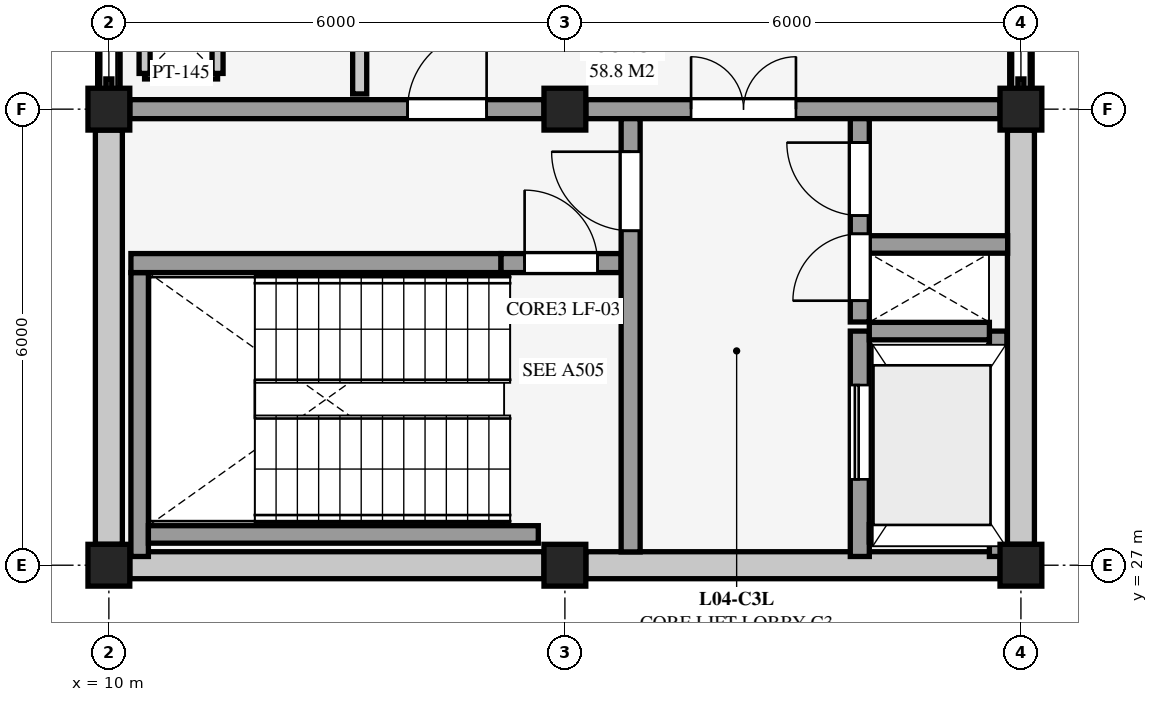
"""IFC4 building model, lengths in metres.
Left out: names, types, materials, properties, quantities, classifications, styles, units other than length and angle.
Written with IfcOpenShell. Run it as: python <this file> out.ifc"""

import sys

from ifc_helpers import new_model, si_unit, direction, frame, frame_2d, origin, origin_2d, place, context, subcontext, project, spatial, rectangle, extrude, element, fill, save


model = new_model("IFC4")
c1 = context("Model", 3, precision=1e-05, world=origin(), true_north=direction((0.0, 1.0)))
c2 = subcontext(c1, "Body", "Model", "MODEL_VIEW")
j1 = project(units=[si_unit("LENGTHUNIT", "METRE"), si_unit("PLANEANGLEUNIT", "RADIAN")], contexts=[c1])
p1 = place(None, origin())
s1 = spatial("IfcSite", under=j1, at=p1, CompositionType="ELEMENT")
p2 = place(p1, origin())
s2 = spatial("IfcBuilding", under=s1, at=p2, CompositionType="ELEMENT")
p3 = place(p2, frame((0.0, 0.0, 13.5)))
s3 = spatial("IfcBuildingStorey", under=s2, at=p3, CompositionType="ELEMENT", Elevation=13.5)
for number, where, z_axis, x_axis in (
    (1, (10.0, 27.0, 0.0), (0.0, 0.0, 1.0), (1.0, 0.0, 0.0)),
    (2, (10.0, 33.0, 0.0), (0.0, 0.0, 1.0), (1.0, 0.0, 0.0)),
    (3, (16.0, 27.0, 0.0), (0.0, 0.0, 1.0), (1.0, 0.0, 0.0)),
    (4, (16.0, 33.0, 0.0), (0.0, 0.0, 1.0), (1.0, 0.0, 0.0)),
    (5, (22.0, 27.0, 0.0), (0.0, 0.0, 1.0), (1.0, 0.0, 0.0)),
    (6, (22.0, 33.0, 0.0), (0.0, 0.0, 1.0), (1.0, 0.0, 0.0)),
):
    element("IfcColumn", number, at=place(p3, frame(where, z_axis=z_axis, x_axis=x_axis)), inside=s3, PredefinedType="COLUMN", context=c2, shape_type="SweptSolid", body=[
        extrude(rectangle(XDim=0.55, YDim=0.55, at=origin_2d()), origin(), (0.0, 0.0, 1.0), 4.5),
    ])
p4 = place(p3, frame((15.725, 27.0, 0.0), z_axis=(0.0, 0.0, 1.0), x_axis=(-1.0, 0.0, 0.0)))
e7 = element("IfcWall", 7, at=p4, inside=s3, PredefinedType="SOLIDWALL", context=c2, shape_type="SweptSolid", body=[
    extrude(rectangle(XDim=5.45, YDim=0.355, at=frame_2d((2.725, 0.0))), origin(), (0.0, 0.0, 1.0), 3.749),
])
p5 = place(p3, frame((21.725, 27.0, 0.0), z_axis=(0.0, 0.0, 1.0), x_axis=(-1.0, 0.0, 0.0)))
e8 = element("IfcWall", 8, at=p5, inside=s3, PredefinedType="SOLIDWALL", context=c2, shape_type="SweptSolid", body=[
    extrude(rectangle(XDim=5.45, YDim=0.355, at=frame_2d((2.725, 0.0))), origin(), (0.0, 0.0, 1.0), 3.831),
])
for number, where, z_axis, x_axis in (
    (9, (10.0, 27.275, 0.0), (0.0, 0.0, 1.0), (0.0, 1.0, 0.0)),
    (10, (22.0, 32.725, 0.0), (0.0, 0.0, 1.0), (0.0, -1.0, 0.0)),
):
    element("IfcWall", number, at=place(p3, frame(where, z_axis=z_axis, x_axis=x_axis)), inside=s3, PredefinedType="SOLIDWALL", context=c2, shape_type="SweptSolid", body=[
        extrude(rectangle(XDim=5.45, YDim=0.355, at=frame_2d((2.725, 0.0))), origin(), (0.0, 0.0, 1.0), 3.881),
    ])
p6 = place(p3, frame((10.0, 33.275, 0.0), z_axis=(0.0, 0.0, 1.0), x_axis=(0.0, 1.0, 0.0)))
e11 = element("IfcWall", 11, at=p6, inside=s3, PredefinedType="SOLIDWALL", context=c2, shape_type="SweptSolid", body=[
    extrude(rectangle(XDim=5.45, YDim=0.295, at=frame_2d((2.725, 0.0))), origin(), (0.0, 0.0, 1.0), 0.52),
])
p7 = place(p3, frame((22.0, 38.725, 0.0), z_axis=(0.0, 0.0, 1.0), x_axis=(0.0, -1.0, 0.0)))
e12 = element("IfcWall", 12, at=p7, inside=s3, PredefinedType="SOLIDWALL", context=c2, shape_type="SweptSolid", body=[
    extrude(rectangle(XDim=5.45, YDim=0.295, at=frame_2d((2.725, 0.0))), origin(), (0.0, 0.0, 1.0), 0.16),
])
for number, where, z_axis, x_axis in (
    (13, (10.47, 33.47, 0.0), (0.0, 0.0, 1.0), (1.0, 0.0, 0.0)),
    (14, (11.43, 33.47, 0.0), (0.0, 0.0, 1.0), (0.0, 1.0, 0.0)),
    (15, (10.47, 34.43, 0.0), (0.0, 0.0, 1.0), (0.0, -1.0, 0.0)),
):
    element("IfcWall", number, at=place(p3, frame(where, z_axis=z_axis, x_axis=x_axis)), inside=s3, PredefinedType="PARTITIONING", context=c2, shape_type="SweptSolid", body=[
        extrude(rectangle(XDim=0.96, YDim=0.145, at=frame_2d((0.48, 0.0))), origin(), (0.0, 0.0, 1.0), 4.288),
    ])
p8 = place(p3, frame((10.275, 33.0, 0.0), z_axis=(0.0, 0.0, 1.0), x_axis=(1.0, 0.0, 0.0)))
e16 = element("IfcWall", 16, at=p8, inside=s3, PredefinedType="SHEAR", context=c2, shape_type="SweptSolid", body=[
    extrude(rectangle(XDim=5.45, YDim=0.25, at=frame_2d((2.725, 0.0))), origin(), (0.0, 0.0, 1.0), 4.288),
])
p9 = place(p8, frame((3.655, 0.0, 0.0)))
e17 = element("IfcOpeningElement", 17, at=p9, cuts=e16, PredefinedType="OPENING", context=c2, shape_type="SweptSolid", body=[
    extrude(rectangle(XDim=1.04, YDim=2.14, at=frame_2d((0.52, 1.07))), frame((0.0, 0.135, 0.0), z_axis=(0.0, -1.0, 0.0), x_axis=(1.0, 0.0, 0.0)), (0.0, 0.0, 1.0), 0.27),
])
p10 = place(p3, frame((16.275, 33.0, 0.0), z_axis=(0.0, 0.0, 1.0), x_axis=(1.0, 0.0, 0.0)))
e18 = element("IfcWall", 18, at=p10, inside=s3, PredefinedType="SHEAR", context=c2, shape_type="SweptSolid", body=[
    extrude(rectangle(XDim=5.45, YDim=0.25, at=frame_2d((2.725, 0.0))), origin(), (0.0, 0.0, 1.0), 4.288),
])
p11 = place(p10, frame((1.385, 0.0, 0.0)))
e19 = element("IfcOpeningElement", 19, at=p11, cuts=e18, PredefinedType="OPENING", context=c2, shape_type="SweptSolid", body=[
    extrude(rectangle(XDim=1.38, YDim=2.16, at=frame_2d((0.69, 1.08))), frame((0.0, 0.135, 0.0), z_axis=(0.0, -1.0, 0.0), x_axis=(1.0, 0.0, 0.0)), (0.0, 0.0, 1.0), 0.27),
])
p12 = place(p3, frame((10.405, 27.115, 0.0), z_axis=(0.0, 0.0, 1.0), x_axis=(0.0, 1.0, 0.0)))
e20 = element("IfcWall", 20, at=p12, inside=s3, PredefinedType="SHEAR", context=c2, shape_type="SweptSolid", body=[
    extrude(rectangle(XDim=3.735, YDim=0.23, at=frame_2d((1.868, 0.0))), origin(), (0.0, 0.0, 1.0), 4.5),
])
p13 = place(p3, frame((10.52, 27.405, 0.0), z_axis=(0.0, 0.0, 1.0), x_axis=(1.0, 0.0, 0.0)))
e21 = element("IfcWall", 21, at=p13, inside=s3, PredefinedType="SHEAR", context=c2, shape_type="SweptSolid", body=[
    extrude(rectangle(XDim=5.13, YDim=0.23, at=frame_2d((2.565, 0.0))), origin(), (0.0, 0.0, 1.0), 4.5),
])
p14 = place(p3, frame((10.29, 30.975, 0.0), z_axis=(0.0, 0.0, 1.0), x_axis=(1.0, 0.0, 0.0)))
e22 = element("IfcWall", 22, at=p14, inside=s3, PredefinedType="SHEAR", context=c2, shape_type="SweptSolid", body=[
    extrude(rectangle(XDim=4.87, YDim=0.25, at=frame_2d((2.435, 0.0))), origin(), (0.0, 0.0, 1.0), 4.5),
])
p15 = place(p3, frame((15.16, 30.975, 0.0), z_axis=(0.0, 0.0, 1.0), x_axis=(1.0, 0.0, 0.0)))
e23 = element("IfcWall", 23, at=p15, inside=s3, PredefinedType="SHEAR", context=c2, shape_type="SweptSolid", body=[
    extrude(rectangle(XDim=1.58, YDim=0.25, at=frame_2d((0.79, 0.0))), origin(), (0.0, 0.0, 1.0), 4.288),
])
p16 = place(p15, frame((0.31, 0.0, 0.0)))
e24 = element("IfcOpeningElement", 24, at=p16, cuts=e23, PredefinedType="OPENING", context=c2, shape_type="SweptSolid", body=[
    extrude(rectangle(XDim=0.96, YDim=2.12, at=frame_2d((0.48, 1.06))), frame((0.0, 0.135, 0.0), z_axis=(0.0, -1.0, 0.0), x_axis=(1.0, 0.0, 0.0)), (0.0, 0.0, 1.0), 0.27),
])
p17 = place(p3, frame((16.865, 27.175, 0.0), z_axis=(0.0, 0.0, 1.0), x_axis=(0.0, 1.0, 0.0)))
e25 = element("IfcWall", 25, at=p17, inside=s3, PredefinedType="SHEAR", context=c2, shape_type="SweptSolid", body=[
    extrude(rectangle(XDim=5.7, YDim=0.25, at=frame_2d((2.85, 0.0))), origin(), (0.0, 0.0, 1.0), 4.288),
])
p18 = place(p17, frame((4.225, 0.0, 0.0)))
e26 = element("IfcOpeningElement", 26, at=p18, cuts=e25, PredefinedType="OPENING", context=c2, shape_type="SweptSolid", body=[
    extrude(rectangle(XDim=1.04, YDim=2.14, at=frame_2d((0.52, 1.07))), frame((0.0, 0.135, 0.0), z_axis=(0.0, -1.0, 0.0), x_axis=(1.0, 0.0, 0.0)), (0.0, 0.0, 1.0), 0.27),
])
p19 = place(p3, frame((19.88, 27.115, 0.0), z_axis=(0.0, 0.0, 1.0), x_axis=(0.0, 1.0, 0.0)))
e27 = element("IfcWall", 27, at=p19, inside=s3, PredefinedType="SHEAR", context=c2, shape_type="SweptSolid", body=[
    extrude(rectangle(XDim=2.965, YDim=0.25, at=frame_2d((1.482, 0.0))), origin(), (0.0, 0.0, 1.0), 4.5),
])
p20 = place(p19, frame((1.015, 0.0, 0.0)))
e28 = element("IfcOpeningElement", 28, at=p20, cuts=e27, PredefinedType="OPENING", context=c2, shape_type="SweptSolid", body=[
    extrude(rectangle(XDim=1.24, YDim=2.2, at=frame_2d((0.62, 1.1))), frame((0.0, 0.135, 0.0), z_axis=(0.0, -1.0, 0.0), x_axis=(1.0, 0.0, 0.0)), (0.0, 0.0, 1.0), 0.27),
])
p21 = place(p3, frame((20.005, 27.42, 0.0), z_axis=(0.0, 0.0, 1.0), x_axis=(1.0, 0.0, 0.0)))
e29 = element("IfcWall", 29, at=p21, inside=s3, PredefinedType="SHEAR", context=c2, shape_type="SweptSolid", body=[
    extrude(rectangle(XDim=1.58, YDim=0.23, at=frame_2d((0.79, 0.0))), origin(), (0.0, 0.0, 1.0), 4.5),
])
p22 = place(p3, frame((21.7, 27.115, 0.0), z_axis=(0.0, 0.0, 1.0), x_axis=(0.0, 1.0, 0.0)))
e30 = element("IfcWall", 30, at=p22, inside=s3, PredefinedType="SHEAR", context=c2, shape_type="SweptSolid", body=[
    extrude(rectangle(XDim=2.965, YDim=0.23, at=frame_2d((1.482, 0.0))), origin(), (0.0, 0.0, 1.0), 4.5),
])
p23 = place(p3, frame((20.005, 30.08, 0.0), z_axis=(0.0, 0.0, 1.0), x_axis=(1.0, 0.0, 0.0)))
e31 = element("IfcWall", 31, at=p23, inside=s3, PredefinedType="SHEAR", context=c2, shape_type="SweptSolid", body=[
    extrude(rectangle(XDim=1.58, YDim=0.23, at=frame_2d((0.79, 0.0))), origin(), (0.0, 0.0, 1.0), 4.5),
])
p24 = place(p3, frame((19.88, 30.2, 0.0), z_axis=(0.0, 0.0, 1.0), x_axis=(0.0, 1.0, 0.0)))
e32 = element("IfcWall", 32, at=p24, inside=s3, PredefinedType="SHEAR", context=c2, shape_type="SweptSolid", body=[
    extrude(rectangle(XDim=2.675, YDim=0.25, at=frame_2d((1.337, 0.0))), origin(), (0.0, 0.0, 1.0), 4.288),
])
p25 = place(p24, frame((0.28, 0.0, 0.0)))
e33 = element("IfcOpeningElement", 33, at=p25, cuts=e32, PredefinedType="OPENING", context=c2, shape_type="SweptSolid", body=[
    extrude(rectangle(XDim=0.88, YDim=2.08, at=frame_2d((0.44, 1.04))), frame((0.0, 0.135, 0.0), z_axis=(0.0, -1.0, 0.0), x_axis=(1.0, 0.0, 0.0)), (0.0, 0.0, 1.0), 0.27),
])
p26 = place(p24, frame((1.4, 0.0, 0.0)))
e34 = element("IfcOpeningElement", 34, at=p26, cuts=e32, PredefinedType="OPENING", context=c2, shape_type="SweptSolid", body=[
    extrude(rectangle(XDim=0.96, YDim=2.12, at=frame_2d((0.48, 1.06))), frame((0.0, 0.135, 0.0), z_axis=(0.0, -1.0, 0.0), x_axis=(1.0, 0.0, 0.0)), (0.0, 0.0, 1.0), 0.27),
])
p27 = place(p3, frame((20.005, 31.22, 0.0), z_axis=(0.0, 0.0, 1.0), x_axis=(1.0, 0.0, 0.0)))
e35 = element("IfcWall", 35, at=p27, inside=s3, PredefinedType="SHEAR", context=c2, shape_type="SweptSolid", body=[
    extrude(rectangle(XDim=1.82, YDim=0.23, at=frame_2d((0.91, 0.0))), origin(), (0.0, 0.0, 1.0), 4.288),
])
p28 = place(p3, frame((13.3, 33.2, 0.0), z_axis=(0.0, 0.0, 1.0), x_axis=(0.0, 1.0, 0.0)))
e36 = element("IfcWall", 36, at=p28, inside=s3, PredefinedType="PARTITIONING", context=c2, shape_type="SweptSolid", body=[
    extrude(rectangle(XDim=7.0, YDim=0.185, at=frame_2d((3.5, 0.0))), origin(), (0.0, 0.0, 1.0), 4.288),
])
p29 = place(p28, frame((2.46, 0.0, 0.0)))
e37 = element("IfcOpeningElement", 37, at=p29, cuts=e36, PredefinedType="OPENING", context=c2, shape_type="SweptSolid", body=[
    extrude(rectangle(XDim=2.08, YDim=2.36, at=frame_2d((1.04, 1.18))), frame((0.0, 0.103, 0.0), z_axis=(0.0, -1.0, 0.0), x_axis=(1.0, 0.0, 0.0)), (0.0, 0.0, 1.0), 0.205),
])
p30 = place(p9, origin())
e38 = element("IfcDoor", 38, at=p30, inside=s3, OperationType="SINGLE_SWING_RIGHT", PredefinedType="DOOR", context=c2, shape_type="SweptSolid", body=[
    extrude(rectangle(XDim=1.04, YDim=2.14, at=frame_2d((0.52, 1.07))), frame((0.0, 0.025, 0.0), z_axis=(0.0, -1.0, 0.0), x_axis=(1.0, 0.0, 0.0)), (0.0, 0.0, 1.0), 0.05),
])
fill(e17, e38)
p31 = place(p11, origin())
e39 = element("IfcDoor", 39, at=p31, inside=s3, OperationType="DOUBLE_DOOR_SINGLE_SWING", PredefinedType="DOOR", context=c2, shape_type="SweptSolid", body=[
    extrude(rectangle(XDim=1.38, YDim=2.16, at=frame_2d((0.69, 1.08))), frame((0.0, 0.025, 0.0), z_axis=(0.0, -1.0, 0.0), x_axis=(1.0, 0.0, 0.0)), (0.0, 0.0, 1.0), 0.05),
])
fill(e19, e39)
p32 = place(p16, origin())
e40 = element("IfcDoor", 40, at=p32, inside=s3, OperationType="SINGLE_SWING_LEFT", PredefinedType="DOOR", context=c2, shape_type="SweptSolid", body=[
    extrude(rectangle(XDim=0.96, YDim=2.12, at=frame_2d((0.48, 1.06))), frame((0.0, 0.025, 0.0), z_axis=(0.0, -1.0, 0.0), x_axis=(1.0, 0.0, 0.0)), (0.0, 0.0, 1.0), 0.05),
])
fill(e24, e40)
p33 = place(p18, origin())
e41 = element("IfcDoor", 41, at=p33, inside=s3, OperationType="SINGLE_SWING_RIGHT", PredefinedType="DOOR", context=c2, shape_type="SweptSolid", body=[
    extrude(rectangle(XDim=1.04, YDim=2.14, at=frame_2d((0.52, 1.07))), frame((0.0, 0.025, 0.0), z_axis=(0.0, -1.0, 0.0), x_axis=(1.0, 0.0, 0.0)), (0.0, 0.0, 1.0), 0.05),
])
fill(e26, e41)
p34 = place(p20, origin())
e42 = element("IfcDoor", 42, at=p34, inside=s3, OperationType="SLIDING_TO_LEFT", PredefinedType="DOOR", context=c2, shape_type="SweptSolid", body=[
    extrude(rectangle(XDim=1.24, YDim=2.2, at=frame_2d((0.62, 1.1))), frame((0.0, 0.025, 0.0), z_axis=(0.0, -1.0, 0.0), x_axis=(1.0, 0.0, 0.0)), (0.0, 0.0, 1.0), 0.05),
])
fill(e28, e42)
p35 = place(p25, origin())
e43 = element("IfcDoor", 43, at=p35, inside=s3, OperationType="SINGLE_SWING_LEFT", PredefinedType="DOOR", context=c2, shape_type="SweptSolid", body=[
    extrude(rectangle(XDim=0.88, YDim=2.08, at=frame_2d((0.44, 1.04))), frame((0.0, 0.025, 0.0), z_axis=(0.0, -1.0, 0.0), x_axis=(1.0, 0.0, 0.0)), (0.0, 0.0, 1.0), 0.05),
])
fill(e33, e43)
p36 = place(p26, origin())
e44 = element("IfcDoor", 44, at=p36, inside=s3, OperationType="SINGLE_SWING_RIGHT", PredefinedType="DOOR", context=c2, shape_type="SweptSolid", body=[
    extrude(rectangle(XDim=0.96, YDim=2.12, at=frame_2d((0.48, 1.06))), frame((0.0, 0.025, 0.0), z_axis=(0.0, -1.0, 0.0), x_axis=(1.0, 0.0, 0.0)), (0.0, 0.0, 1.0), 0.05),
])
fill(e34, e44)
save(model, sys.argv[1])
